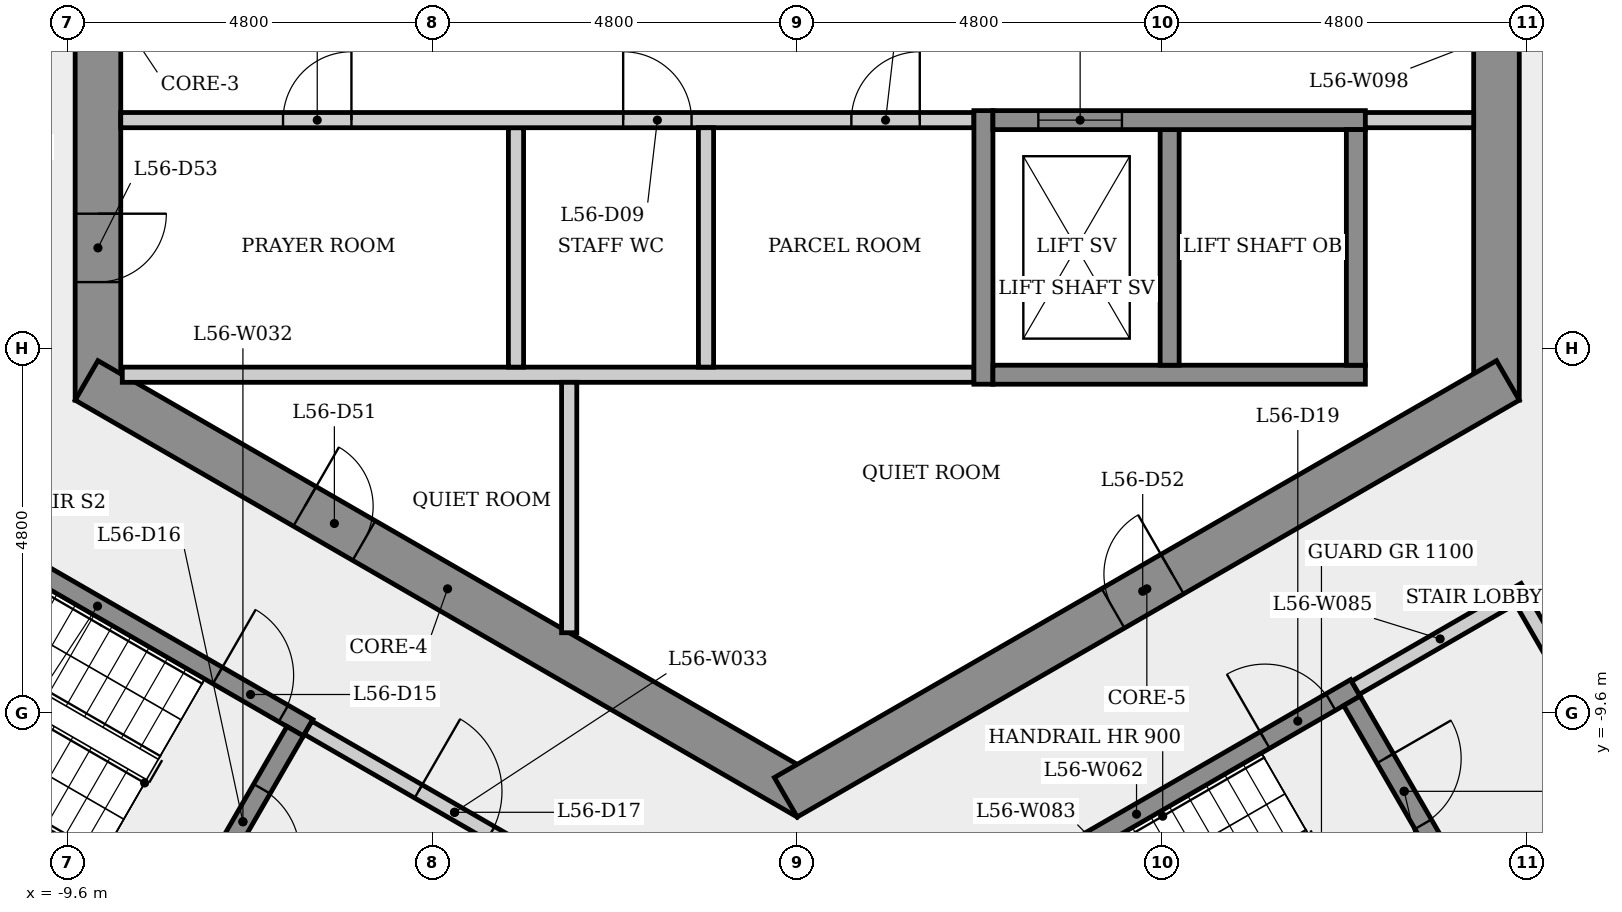
"""IFC4 building model, lengths in metres.
Left out: names, types, materials, properties, quantities, classifications, styles, units other than length and angle.
Written with IfcOpenShell. Run it as: python <this file> out.ifc"""

import sys

from ifc_helpers import new_model, si_unit, direction, frame, frame_2d, origin, place, context, subcontext, project, spatial, rectangle, extrude, element, fill, save


model = new_model("IFC4")
c1 = context("Model", 3, precision=1e-05, world=origin(), true_north=direction((0.0, 1.0)))
c2 = subcontext(c1, "Body", "Model", "MODEL_VIEW")
j1 = project(units=[si_unit("LENGTHUNIT", "METRE"), si_unit("PLANEANGLEUNIT", "RADIAN")], contexts=[c1])
p1 = place(None, origin())
s1 = spatial("IfcSite", under=j1, at=p1, CompositionType="ELEMENT")
p2 = place(p1, origin())
s2 = spatial("IfcBuilding", under=s1, at=p2, CompositionType="ELEMENT")
p3 = place(p2, frame((0.0, 0.0, 210.1)))
s3 = spatial("IfcBuildingStorey", under=s2, at=p3, CompositionType="ELEMENT", Elevation=210.1)
p4 = place(p3, frame((9.2, -5.485, 0.0), z_axis=(0.0, 0.0, 1.0), x_axis=(0.0, 1.0, 0.0)))
e1 = element("IfcWall", 1, at=p4, inside=s3, PredefinedType="SHEAR", context=c2, shape_type="SweptSolid", body=[
    extrude(rectangle(XDim=10.97, YDim=0.6, at=frame_2d((5.485, 0.0))), origin(), (0.0, 0.0, 1.0), 4.0),
])
p5 = place(p4, frame((4.685, 0.0, 0.0)))
e2 = element("IfcOpeningElement", 2, at=p5, cuts=e1, PredefinedType="OPENING", context=c2, shape_type="SweptSolid", body=[
    extrude(rectangle(XDim=1.6, YDim=2.1, at=frame_2d((0.8, 1.05))), frame((0.0, 0.31, 0.0), z_axis=(0.0, -1.0, 0.0), x_axis=(1.0, 0.0, 0.0)), (0.0, 0.0, 1.0), 0.62),
])
p6 = place(p3, frame((-9.2, 5.485, 0.0), z_axis=(0.0, 0.0, 1.0), x_axis=(0.0, -1.0, 0.0)))
e3 = element("IfcWall", 3, at=p6, inside=s3, PredefinedType="SHEAR", context=c2, shape_type="SweptSolid", body=[
    extrude(rectangle(XDim=10.97, YDim=0.6, at=frame_2d((5.485, 0.0))), origin(), (0.0, 0.0, 1.0), 4.0),
])
p7 = place(p6, frame((8.516, 0.0, 0.0)))
e4 = element("IfcOpeningElement", 4, at=p7, cuts=e3, PredefinedType="OPENING", context=c2, shape_type="SweptSolid", body=[
    extrude(rectangle(XDim=0.9, YDim=2.1, at=frame_2d((0.45, 1.05))), frame((0.0, 0.31, 0.0), z_axis=(0.0, -1.0, 0.0), x_axis=(1.0, 0.0, 0.0)), (0.0, 0.0, 1.0), 0.62),
])
p8 = place(p6, frame((4.685, 0.0, 0.0)))
e5 = element("IfcOpeningElement", 5, at=p8, cuts=e3, PredefinedType="OPENING", context=c2, shape_type="SweptSolid", body=[
    extrude(rectangle(XDim=1.6, YDim=2.1, at=frame_2d((0.8, 1.05))), frame((0.0, 0.31, 0.0), z_axis=(0.0, -1.0, 0.0), x_axis=(1.0, 0.0, 0.0)), (0.0, 0.0, 1.0), 0.62),
])
p9 = place(p3, frame((-9.35, -5.225, 0.0), z_axis=(0.0, 0.0, 1.0), x_axis=(0.866023993627, -0.500002442456, 0.0)))
e6 = element("IfcWall", 6, at=p9, inside=s3, PredefinedType="SHEAR", context=c2, shape_type="SweptSolid", body=[
    extrude(rectangle(XDim=10.97, YDim=0.6, at=frame_2d((5.485, 0.0))), origin(), (0.0, 0.0, 1.0), 4.0),
])
p10 = place(p9, frame((3.315, 0.0, 0.0)))
e7 = element("IfcOpeningElement", 7, at=p10, cuts=e6, PredefinedType="OPENING", context=c2, shape_type="SweptSolid", body=[
    extrude(rectangle(XDim=0.9, YDim=2.1, at=frame_2d((0.45, 1.05))), frame((0.0, 0.31, 0.0), z_axis=(0.0, -1.0, 0.0), x_axis=(1.0, 0.0, 0.0)), (0.0, 0.0, 1.0), 0.62),
])
p11 = place(p3, frame((-0.15, -10.71, 0.0), z_axis=(0.0, 0.0, 1.0), x_axis=(0.866023993627, 0.500002442456, 0.0)))
e8 = element("IfcWall", 8, at=p11, inside=s3, PredefinedType="SHEAR", context=c2, shape_type="SweptSolid", body=[
    extrude(rectangle(XDim=10.97, YDim=0.6, at=frame_2d((5.485, 0.0))), origin(), (0.0, 0.0, 1.0), 4.0),
])
p12 = place(p11, frame((4.972, 0.0, 0.0)))
e9 = element("IfcOpeningElement", 9, at=p12, cuts=e8, PredefinedType="OPENING", context=c2, shape_type="SweptSolid", body=[
    extrude(rectangle(XDim=0.9, YDim=2.1, at=frame_2d((0.45, 1.05))), frame((0.0, 0.31, 0.0), z_axis=(0.0, -1.0, 0.0), x_axis=(1.0, 0.0, 0.0)), (0.0, 0.0, 1.0), 0.62),
])
p13 = place(p3, frame((-11.977, -6.595, 0.0), z_axis=(0.0, 0.0, 1.0), x_axis=(0.866025499775, -0.499999833739, 0.0)))
e10 = element("IfcWall", 10, at=p13, inside=s3, PredefinedType="SHEAR", context=c2, shape_type="SweptSolid", body=[
    extrude(rectangle(XDim=6.4, YDim=0.25, at=frame_2d((3.2, 0.0))), origin(), (0.0, 0.0, 1.0), 3.6),
])
p14 = place(p13, frame((5.025, 0.0, 0.0)))
e11 = element("IfcOpeningElement", 11, at=p14, cuts=e10, PredefinedType="OPENING", context=c2, shape_type="SweptSolid", body=[
    extrude(rectangle(XDim=1.0, YDim=2.1, at=frame_2d((0.5, 1.05))), frame((0.0, 0.135, 0.0), z_axis=(0.0, -1.0, 0.0), x_axis=(1.0, 0.0, 0.0)), (0.0, 0.0, 1.0), 0.27),
])
p15 = place(p3, frame((-8.88, -5.15, 0.0), z_axis=(0.0, 0.0, 1.0), x_axis=(1.0, 0.0, 0.0)))
e12 = element("IfcWall", 12, at=p15, inside=s3, PredefinedType="PARTITIONING", context=c2, shape_type="SweptSolid", body=[
    extrude(rectangle(XDim=11.205, YDim=0.2, at=frame_2d((5.603, 0.0))), origin(), (0.0, 0.0, 1.0), 3.6),
])
p16 = place(p3, frame((-7.935, -12.393, 0.0), z_axis=(0.0, 0.0, 1.0), x_axis=(-0.866025499775, 0.499999833739, 0.0)))
e13 = element("IfcWall", 13, at=p16, inside=s3, PredefinedType="SHEAR", context=c2, shape_type="SweptSolid", body=[
    extrude(rectangle(XDim=6.4, YDim=0.25, at=frame_2d((3.2, 0.0))), origin(), (0.0, 0.0, 1.0), 3.6),
])
p17 = place(p3, frame((-6.605, -9.841, 0.0), z_axis=(0.0, 0.0, 1.0), x_axis=(-0.499996545922, -0.866027397988, 0.0)))
e14 = element("IfcWall", 14, at=p17, inside=s3, PredefinedType="SHEAR", context=c2, shape_type="SweptSolid", body=[
    extrude(rectangle(XDim=2.75, YDim=0.25, at=frame_2d((1.375, 0.0))), origin(), (0.0, 0.0, 1.0), 3.6),
])
p18 = place(p17, frame((0.875, 0.0, 0.0)))
e15 = element("IfcOpeningElement", 15, at=p18, cuts=e14, PredefinedType="OPENING", context=c2, shape_type="SweptSolid", body=[
    extrude(rectangle(XDim=1.0, YDim=2.1, at=frame_2d((0.5, 1.05))), frame((0.0, 0.135, 0.0), z_axis=(0.0, -1.0, 0.0), x_axis=(1.0, 0.0, 0.0)), (0.0, 0.0, 1.0), 0.27),
])
p19 = place(p3, frame((-6.435, -9.795, 0.0), z_axis=(0.0, 0.0, 1.0), x_axis=(0.866012907634, -0.500021643343, 0.0)))
e16 = element("IfcWall", 16, at=p19, inside=s3, PredefinedType="PARTITIONING", context=c2, shape_type="SweptSolid", body=[
    extrude(rectangle(XDim=4.45, YDim=0.2, at=frame_2d((2.225, 0.0))), origin(), (0.0, 0.0, 1.0), 3.6),
])
p20 = place(p19, frame((1.675, 0.0, 0.0)))
e17 = element("IfcOpeningElement", 17, at=p20, cuts=e16, PredefinedType="OPENING", context=c2, shape_type="SweptSolid", body=[
    extrude(rectangle(XDim=1.1, YDim=2.1, at=frame_2d((0.55, 1.05))), frame((0.0, 0.11, 0.0), z_axis=(0.0, -1.0, 0.0), x_axis=(1.0, 0.0, 0.0)), (0.0, 0.0, 1.0), 0.22),
])
p21 = place(p3, frame((-3.7, -1.9, 0.0), z_axis=(0.0, 0.0, 1.0), x_axis=(0.0, -1.0, 0.0)))
e18 = element("IfcWall", 18, at=p21, inside=s3, PredefinedType="PARTITIONING", context=c2, shape_type="SweptSolid", body=[
    extrude(rectangle(XDim=3.15, YDim=0.2, at=frame_2d((1.575, 0.0))), origin(), (0.0, 0.0, 1.0), 3.6),
])
p22 = place(p3, frame((-8.9, -1.8, 0.0), z_axis=(0.0, 0.0, 1.0), x_axis=(1.0, 0.0, 0.0)))
e19 = element("IfcWall", 19, at=p22, inside=s3, PredefinedType="PARTITIONING", context=c2, shape_type="SweptSolid", body=[
    extrude(rectangle(XDim=11.225, YDim=0.2, at=frame_2d((5.613, 0.0))), origin(), (0.0, 0.0, 1.0), 3.6),
])
p23 = place(p22, frame((2.135, 0.0, 0.0)))
e20 = element("IfcOpeningElement", 20, at=p23, cuts=e19, PredefinedType="OPENING", context=c2, shape_type="SweptSolid", body=[
    extrude(rectangle(XDim=0.9, YDim=2.1, at=frame_2d((0.45, 1.05))), frame((0.0, 0.11, 0.0), z_axis=(0.0, -1.0, 0.0), x_axis=(1.0, 0.0, 0.0)), (0.0, 0.0, 1.0), 0.22),
])
p24 = place(p22, frame((6.61, 0.0, 0.0)))
e21 = element("IfcOpeningElement", 21, at=p24, cuts=e19, PredefinedType="OPENING", context=c2, shape_type="SweptSolid", body=[
    extrude(rectangle(XDim=0.9, YDim=2.1, at=frame_2d((0.45, 1.05))), frame((0.0, 0.11, 0.0), z_axis=(0.0, -1.0, 0.0), x_axis=(1.0, 0.0, 0.0)), (0.0, 0.0, 1.0), 0.22),
])
p25 = place(p22, frame((9.613, 0.0, 0.0)))
e22 = element("IfcOpeningElement", 22, at=p25, cuts=e19, PredefinedType="OPENING", context=c2, shape_type="SweptSolid", body=[
    extrude(rectangle(XDim=0.9, YDim=2.1, at=frame_2d((0.45, 1.05))), frame((0.0, 0.11, 0.0), z_axis=(0.0, -1.0, 0.0), x_axis=(1.0, 0.0, 0.0)), (0.0, 0.0, 1.0), 0.22),
])
p26 = place(p3, frame((-3.0, -5.25, 0.0), z_axis=(0.0, 0.0, 1.0), x_axis=(0.0, -1.0, 0.0)))
e23 = element("IfcWall", 23, at=p26, inside=s3, PredefinedType="PARTITIONING", context=c2, shape_type="SweptSolid", body=[
    extrude(rectangle(XDim=3.295, YDim=0.2, at=frame_2d((1.647, 0.0))), origin(), (0.0, 0.0, 1.0), 3.6),
])
p27 = place(p3, frame((-1.2, -1.9, 0.0), z_axis=(0.0, 0.0, 1.0), x_axis=(0.0, -1.0, 0.0)))
e24 = element("IfcWall", 24, at=p27, inside=s3, PredefinedType="PARTITIONING", context=c2, shape_type="SweptSolid", body=[
    extrude(rectangle(XDim=3.15, YDim=0.2, at=frame_2d((1.575, 0.0))), origin(), (0.0, 0.0, 1.0), 3.6),
])
p28 = place(p3, frame((1.585, -12.595, 0.0), z_axis=(0.0, 0.0, 1.0), x_axis=(0.866036417653, 0.499980922934, 0.0)))
e25 = element("IfcWall", 25, at=p28, inside=s3, PredefinedType="SHEAR", context=c2, shape_type="SweptSolid", body=[
    extrude(rectangle(XDim=6.65, YDim=0.25, at=frame_2d((3.325, 0.0))), origin(), (0.0, 0.0, 1.0), 3.6),
])
p29 = place(p28, frame((5.275, 0.0, 0.0)))
e26 = element("IfcOpeningElement", 26, at=p29, cuts=e25, PredefinedType="OPENING", context=c2, shape_type="SweptSolid", body=[
    extrude(rectangle(XDim=1.0, YDim=2.1, at=frame_2d((0.5, 1.05))), frame((0.0, 0.135, 0.0), z_axis=(0.0, -1.0, 0.0), x_axis=(1.0, 0.0, 0.0)), (0.0, 0.0, 1.0), 0.27),
])
p30 = place(p3, frame((2.45, -5.275, 0.0), z_axis=(0.0, 0.0, 1.0), x_axis=(0.0, 1.0, 0.0)))
e27 = element("IfcWall", 27, at=p30, inside=s3, PredefinedType="SHEAR", context=c2, shape_type="SweptSolid", body=[
    extrude(rectangle(XDim=3.6, YDim=0.25, at=frame_2d((1.8, 0.0))), origin(), (0.0, 0.0, 1.0), 3.6),
])
p31 = place(p3, frame((2.575, -5.15, 0.0), z_axis=(0.0, 0.0, 1.0), x_axis=(1.0, 0.0, 0.0)))
e28 = element("IfcWall", 28, at=p31, inside=s3, PredefinedType="SHEAR", context=c2, shape_type="SweptSolid", body=[
    extrude(rectangle(XDim=4.9, YDim=0.25, at=frame_2d((2.45, 0.0))), origin(), (0.0, 0.0, 1.0), 3.6),
])
p32 = place(p3, frame((4.9, -1.925, 0.0), z_axis=(0.0, 0.0, 1.0), x_axis=(0.0, -1.0, 0.0)))
e29 = element("IfcWall", 29, at=p32, inside=s3, PredefinedType="SHEAR", context=c2, shape_type="SweptSolid", body=[
    extrude(rectangle(XDim=3.1, YDim=0.25, at=frame_2d((1.55, 0.0))), origin(), (0.0, 0.0, 1.0), 4.0),
])
p33 = place(p3, frame((2.575, -1.8, 0.0), z_axis=(0.0, 0.0, 1.0), x_axis=(1.0, 0.0, 0.0)))
e30 = element("IfcWall", 30, at=p33, inside=s3, PredefinedType="SHEAR", context=c2, shape_type="SweptSolid", body=[
    extrude(rectangle(XDim=4.9, YDim=0.25, at=frame_2d((2.45, 0.0))), origin(), (0.0, 0.0, 1.0), 3.6),
])
p34 = place(p33, frame((0.597, 0.0, 0.0)))
e31 = element("IfcOpeningElement", 31, at=p34, cuts=e30, PredefinedType="OPENING", context=c2, shape_type="SweptSolid", body=[
    extrude(rectangle(XDim=1.1, YDim=2.1, at=frame_2d((0.55, 1.05))), frame((0.0, 0.135, 0.0), z_axis=(0.0, -1.0, 0.0), x_axis=(1.0, 0.0, 0.0)), (0.0, 0.0, 1.0), 0.27),
])
p35 = place(p3, frame((7.298, -9.441, 0.0), z_axis=(0.0, 0.0, 1.0), x_axis=(0.500034990121, -0.866005201286, 0.0)))
e32 = element("IfcWall", 32, at=p35, inside=s3, PredefinedType="SHEAR", context=c2, shape_type="SweptSolid", body=[
    extrude(rectangle(XDim=2.75, YDim=0.25, at=frame_2d((1.375, 0.0))), origin(), (0.0, 0.0, 1.0), 3.6),
])
p36 = place(p35, frame((0.875, 0.0, 0.0)))
e33 = element("IfcOpeningElement", 33, at=p36, cuts=e32, PredefinedType="OPENING", context=c2, shape_type="SweptSolid", body=[
    extrude(rectangle(XDim=1.0, YDim=2.1, at=frame_2d((0.5, 1.05))), frame((0.0, 0.135, 0.0), z_axis=(0.0, -1.0, 0.0), x_axis=(1.0, 0.0, 0.0)), (0.0, 0.0, 1.0), 0.27),
])
p37 = place(p3, frame((7.344, -9.27, 0.0), z_axis=(0.0, 0.0, 1.0), x_axis=(0.866005588531, 0.500034319456, 0.0)))
e34 = element("IfcWall", 34, at=p37, inside=s3, PredefinedType="PARTITIONING", context=c2, shape_type="SweptSolid", body=[
    extrude(rectangle(XDim=2.575, YDim=0.2, at=frame_2d((1.288, 0.0))), origin(), (0.0, 0.0, 1.0), 3.6),
])
p38 = place(p3, frame((7.35, -1.925, 0.0), z_axis=(0.0, 0.0, 1.0), x_axis=(0.0, -1.0, 0.0)))
e35 = element("IfcWall", 35, at=p38, inside=s3, PredefinedType="SHEAR", context=c2, shape_type="SweptSolid", body=[
    extrude(rectangle(XDim=3.1, YDim=0.25, at=frame_2d((1.55, 0.0))), origin(), (0.0, 0.0, 1.0), 4.0),
])
p39 = place(p3, frame((8.9, -1.8, 0.0), z_axis=(0.0, 0.0, 1.0), x_axis=(-1.0, 0.0, 0.0)))
e36 = element("IfcWall", 36, at=p39, inside=s3, PredefinedType="PARTITIONING", context=c2, shape_type="SweptSolid", body=[
    extrude(rectangle(XDim=1.425, YDim=0.2, at=frame_2d((0.712, 0.0))), origin(), (0.0, 0.0, 1.0), 3.6),
])
p40 = place(p3, frame((9.537, -8.119, 0.0), z_axis=(0.0, 0.0, 1.0), x_axis=(0.499990139034, -0.866031096941, 0.0)))
e37 = element("IfcWall", 37, at=p40, inside=s3, PredefinedType="PARTITIONING", context=c2, shape_type="SweptSolid", body=[
    extrude(rectangle(XDim=3.0, YDim=0.2, at=frame_2d((1.5, 0.0))), origin(), (0.0, 0.0, 1.0), 3.6),
])
p41 = place(p40, frame((0.935, 0.0, 0.0)))
e38 = element("IfcOpeningElement", 38, at=p41, cuts=e37, PredefinedType="OPENING", context=c2, shape_type="SweptSolid", body=[
    extrude(rectangle(XDim=1.0, YDim=2.1, at=frame_2d((0.5, 1.05))), frame((0.0, 0.11, 0.0), z_axis=(0.0, -1.0, 0.0), x_axis=(1.0, 0.0, 0.0)), (0.0, 0.0, 1.0), 0.22),
])
p42 = place(p3, frame((10.901, -10.681, 0.0), z_axis=(0.0, 0.0, 1.0), x_axis=(-0.866007538022, -0.500030943131, 0.0)))
e39 = element("IfcWall", 39, at=p42, inside=s3, PredefinedType="PLUMBINGWALL", context=c2, shape_type="SweptSolid", body=[
    extrude(rectangle(XDim=2.375, YDim=0.2, at=frame_2d((1.188, 0.0))), origin(), (0.0, 0.0, 1.0), 3.6),
])
p43 = place(p34, origin())
e40 = element("IfcDoor", 40, at=p43, inside=s3, OperationType="SLIDING_TO_LEFT", PredefinedType="DOOR", context=c2, shape_type="SweptSolid", body=[
    extrude(rectangle(XDim=1.1, YDim=2.1, at=frame_2d((0.55, 1.05))), frame((0.0, 0.025, 0.0), z_axis=(0.0, -1.0, 0.0), x_axis=(1.0, 0.0, 0.0)), (0.0, 0.0, 1.0), 0.05),
])
fill(e31, e40)
p44 = place(p23, origin())
e41 = element("IfcDoor", 41, at=p44, inside=s3, OperationType="SINGLE_SWING_RIGHT", PredefinedType="DOOR", context=c2, shape_type="SweptSolid", body=[
    extrude(rectangle(XDim=0.9, YDim=2.1, at=frame_2d((0.45, 1.05))), frame((0.0, 0.025, 0.0), z_axis=(0.0, -1.0, 0.0), x_axis=(1.0, 0.0, 0.0)), (0.0, 0.0, 1.0), 0.05),
])
fill(e20, e41)
p45 = place(p24, origin())
e42 = element("IfcDoor", 42, at=p45, inside=s3, OperationType="SINGLE_SWING_LEFT", PredefinedType="DOOR", context=c2, shape_type="SweptSolid", body=[
    extrude(rectangle(XDim=0.9, YDim=2.1, at=frame_2d((0.45, 1.05))), frame((0.0, 0.025, 0.0), z_axis=(0.0, -1.0, 0.0), x_axis=(1.0, 0.0, 0.0)), (0.0, 0.0, 1.0), 0.05),
])
fill(e21, e42)
p46 = place(p25, origin())
e43 = element("IfcDoor", 43, at=p46, inside=s3, OperationType="SINGLE_SWING_RIGHT", PredefinedType="DOOR", context=c2, shape_type="SweptSolid", body=[
    extrude(rectangle(XDim=0.9, YDim=2.1, at=frame_2d((0.45, 1.05))), frame((0.0, 0.025, 0.0), z_axis=(0.0, -1.0, 0.0), x_axis=(1.0, 0.0, 0.0)), (0.0, 0.0, 1.0), 0.05),
])
fill(e22, e43)
p47 = place(p14, origin())
e44 = element("IfcDoor", 44, at=p47, inside=s3, OperationType="SINGLE_SWING_LEFT", PredefinedType="DOOR", context=c2, shape_type="SweptSolid", body=[
    extrude(rectangle(XDim=1.0, YDim=2.1, at=frame_2d((0.5, 1.05))), frame((0.0, 0.025, 0.0), z_axis=(0.0, -1.0, 0.0), x_axis=(1.0, 0.0, 0.0)), (0.0, 0.0, 1.0), 0.05),
])
fill(e11, e44)
p48 = place(p18, origin())
e45 = element("IfcDoor", 45, at=p48, inside=s3, OperationType="SINGLE_SWING_RIGHT", PredefinedType="DOOR", context=c2, shape_type="SweptSolid", body=[
    extrude(rectangle(XDim=1.0, YDim=2.1, at=frame_2d((0.5, 1.05))), frame((0.0, 0.025, 0.0), z_axis=(0.0, -1.0, 0.0), x_axis=(1.0, 0.0, 0.0)), (0.0, 0.0, 1.0), 0.05),
])
fill(e15, e45)
p49 = place(p20, origin())
e46 = element("IfcDoor", 46, at=p49, inside=s3, OperationType="SINGLE_SWING_LEFT", PredefinedType="DOOR", context=c2, shape_type="SweptSolid", body=[
    extrude(rectangle(XDim=1.1, YDim=2.1, at=frame_2d((0.55, 1.05))), frame((0.0, 0.025, 0.0), z_axis=(0.0, -1.0, 0.0), x_axis=(1.0, 0.0, 0.0)), (0.0, 0.0, 1.0), 0.05),
])
fill(e17, e46)
p50 = place(p29, origin())
e47 = element("IfcDoor", 47, at=p50, inside=s3, OperationType="SINGLE_SWING_LEFT", PredefinedType="DOOR", context=c2, shape_type="SweptSolid", body=[
    extrude(rectangle(XDim=1.0, YDim=2.1, at=frame_2d((0.5, 1.05))), frame((0.0, 0.025, 0.0), z_axis=(0.0, -1.0, 0.0), x_axis=(1.0, 0.0, 0.0)), (0.0, 0.0, 1.0), 0.05),
])
fill(e26, e47)
p51 = place(p36, origin())
e48 = element("IfcDoor", 48, at=p51, inside=s3, OperationType="SINGLE_SWING_LEFT", PredefinedType="DOOR", context=c2, shape_type="SweptSolid", body=[
    extrude(rectangle(XDim=1.0, YDim=2.1, at=frame_2d((0.5, 1.05))), frame((0.0, 0.025, 0.0), z_axis=(0.0, -1.0, 0.0), x_axis=(1.0, 0.0, 0.0)), (0.0, 0.0, 1.0), 0.05),
])
fill(e33, e48)
p52 = place(p10, origin())
e49 = element("IfcDoor", 49, at=p52, inside=s3, OperationType="SINGLE_SWING_LEFT", PredefinedType="DOOR", context=c2, shape_type="SweptSolid", body=[
    extrude(rectangle(XDim=0.9, YDim=2.1, at=frame_2d((0.45, 1.05))), frame((0.0, 0.025, 0.0), z_axis=(0.0, -1.0, 0.0), x_axis=(1.0, 0.0, 0.0)), (0.0, 0.0, 1.0), 0.05),
])
fill(e7, e49)
p53 = place(p12, origin())
e50 = element("IfcDoor", 50, at=p53, inside=s3, OperationType="SINGLE_SWING_RIGHT", PredefinedType="DOOR", context=c2, shape_type="SweptSolid", body=[
    extrude(rectangle(XDim=0.9, YDim=2.1, at=frame_2d((0.45, 1.05))), frame((0.0, 0.025, 0.0), z_axis=(0.0, -1.0, 0.0), x_axis=(1.0, 0.0, 0.0)), (0.0, 0.0, 1.0), 0.05),
])
fill(e9, e50)
p54 = place(p7, origin())
e51 = element("IfcDoor", 51, at=p54, inside=s3, OperationType="SINGLE_SWING_LEFT", PredefinedType="DOOR", context=c2, shape_type="SweptSolid", body=[
    extrude(rectangle(XDim=0.9, YDim=2.1, at=frame_2d((0.45, 1.05))), frame((0.0, 0.025, 0.0), z_axis=(0.0, -1.0, 0.0), x_axis=(1.0, 0.0, 0.0)), (0.0, 0.0, 1.0), 0.05),
])
fill(e4, e51)
save(model, sys.argv[1])
